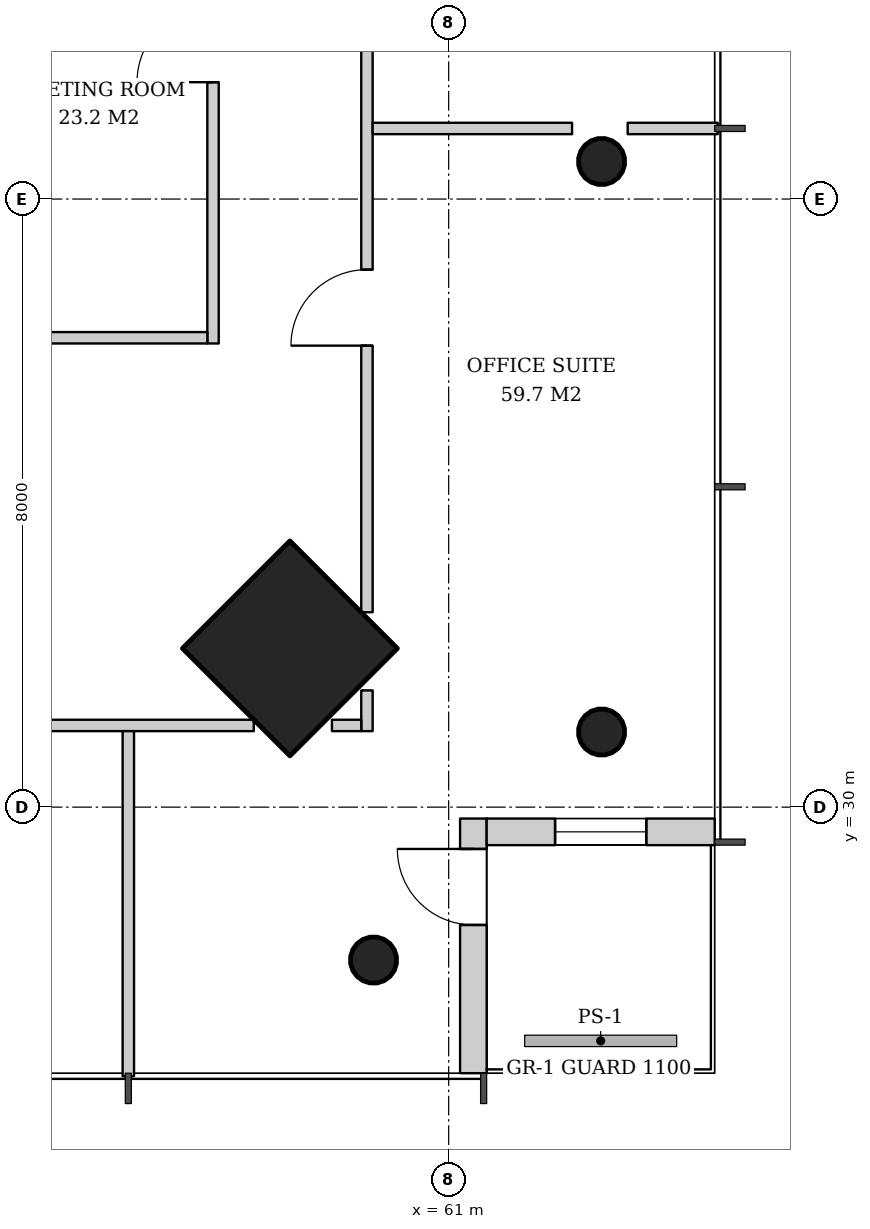
"""IFC4 building model, lengths in metres.
Left out: names, types, materials, properties, quantities, classifications, styles, units other than length and angle.
Written with IfcOpenShell. Run it as: python <this file> out.ifc"""

import sys

from ifc_helpers import new_model, si_unit, direction, frame, frame_2d, origin, origin_2d, place, context, subcontext, project, spatial, rectangle, hollow_circle, extrude, element, fill, save


model = new_model("IFC4")
c1 = context("Model", 3, precision=1e-05, world=origin(), true_north=direction((0.0, 1.0)))
c2 = subcontext(c1, "Body", "Model", "MODEL_VIEW")
j1 = project(units=[si_unit("LENGTHUNIT", "METRE"), si_unit("PLANEANGLEUNIT", "RADIAN")], contexts=[c1])
p1 = place(None, origin())
s1 = spatial("IfcSite", under=j1, at=p1, CompositionType="ELEMENT")
p2 = place(p1, origin())
s2 = spatial("IfcBuilding", under=s1, at=p2, CompositionType="ELEMENT")
p3 = place(p2, frame((0.0, 0.0, 207.2)))
s3 = spatial("IfcBuildingStorey", under=s2, at=p3, CompositionType="ELEMENT", Elevation=207.2)
p4 = place(p3, frame((63.05, 30.95, 0.0), z_axis=(-0.031962158256, 0.031962158256, 0.998977898093), x_axis=(-0.707106781187, -0.707106781187, 0.0)))
e1 = element("IfcColumn", 1, at=p4, inside=s3, PredefinedType="COLUMN", context=c2, shape_type="SweptSolid", body=[
    extrude(hollow_circle(Radius=0.305, WallThickness=0.025, at=origin_2d()), origin(), (0.0, 0.0, 1.0), 3.804),
])
p5 = place(p3, frame((63.05, 38.475, 0.0), z_axis=(-0.031974442509, 0.015923015547, 0.999361842679), x_axis=(-0.445775033553, -0.895145027055, 0.0)))
e2 = element("IfcColumn", 2, at=p5, inside=s3, PredefinedType="COLUMN", context=c2, shape_type="SweptSolid", body=[
    extrude(hollow_circle(Radius=0.305, WallThickness=0.025, at=origin_2d()), origin(), (0.0, 0.0, 1.0), 3.802),
])
p6 = place(p3, frame((58.95, 32.05, 0.0), z_axis=(-0.031898107953, 0.031898107953, 0.998981992539), x_axis=(-0.707106781187, -0.707106781187, 0.0)))
e3 = element("IfcColumn", 3, at=p6, inside=s3, PredefinedType="COLUMN", context=c2, shape_type="SweptSolid", body=[
    extrude(rectangle(XDim=2.0, YDim=2.0, at=origin_2d()), origin(), (0.0, 0.0, 1.0), 3.804),
])
p7 = place(p3, frame((60.05, 27.95, 0.0), z_axis=(-0.031962158256, 0.031962158256, 0.998977898093), x_axis=(-0.707106781187, -0.707106781187, 0.0)))
e4 = element("IfcColumn", 4, at=p7, inside=s3, PredefinedType="COLUMN", context=c2, shape_type="SweptSolid", body=[
    extrude(hollow_circle(Radius=0.305, WallThickness=0.025, at=origin_2d()), origin(), (0.0, 0.0, 1.0), 3.804),
])
p8 = place(p3, frame((61.325, 26.5, 0.0), z_axis=(0.0, 0.0, 1.0), x_axis=(0.0, 1.0, 0.0)))
e5 = element("IfcWall", 5, at=p8, inside=s3, PredefinedType="SOLIDWALL", context=c2, shape_type="SweptSolid", body=[
    extrude(rectangle(XDim=3.35, YDim=0.35, at=frame_2d((1.675, 0.0))), origin(), (0.0, 0.0, 1.0), 3.62),
])
p9 = place(p8, frame((1.95, 0.0, 0.0)))
e6 = element("IfcOpeningElement", 6, at=p9, cuts=e5, PredefinedType="OPENING", context=c2, shape_type="SweptSolid", body=[
    extrude(rectangle(XDim=1.0, YDim=2.4, at=frame_2d((0.5, 1.2))), frame((0.0, 0.185, 0.0), z_axis=(0.0, -1.0, 0.0), x_axis=(1.0, 0.0, 0.0)), (0.0, 0.0, 1.0), 0.37),
])
p10 = place(p3, frame((61.5, 29.675, 0.0), z_axis=(0.0, 0.0, 1.0), x_axis=(1.0, 0.0, 0.0)))
e7 = element("IfcWall", 7, at=p10, inside=s3, PredefinedType="SOLIDWALL", context=c2, shape_type="SweptSolid", body=[
    extrude(rectangle(XDim=3.0, YDim=0.35, at=frame_2d((1.5, 0.0))), origin(), (0.0, 0.0, 1.0), 3.62),
])
p11 = place(p10, frame((0.9, 0.0, 0.6)))
e8 = element("IfcOpeningElement", 8, at=p11, cuts=e7, PredefinedType="OPENING", context=c2, shape_type="SweptSolid", body=[
    extrude(rectangle(XDim=1.2, YDim=2.55, at=frame_2d((0.6, 1.275))), frame((0.0, 0.185, 0.0), z_axis=(0.0, -1.0, 0.0), x_axis=(1.0, 0.0, 0.0)), (0.0, 0.0, 1.0), 0.37),
])
p12 = place(p3, frame((57.9, 36.1, 0.0), z_axis=(0.0, 0.0, 1.0), x_axis=(0.0, 1.0, 0.0)))
e9 = element("IfcWall", 9, at=p12, inside=s3, PredefinedType="PARTITIONING", context=c2, shape_type="SweptSolid", body=[
    extrude(rectangle(XDim=7.875, YDim=0.15, at=frame_2d((3.938, 0.0))), origin(), (0.0, 0.0, 1.0), 2.867),
])
p13 = place(p12, frame((3.438, 0.0, 0.0)))
e10 = element("IfcOpeningElement", 10, at=p13, cuts=e9, PredefinedType="OPENING", context=c2, shape_type="SweptSolid", body=[
    extrude(rectangle(XDim=1.0, YDim=2.1, at=frame_2d((0.5, 1.05))), frame((0.0, 0.085, 0.0), z_axis=(0.0, -1.0, 0.0), x_axis=(1.0, 0.0, 0.0)), (0.0, 0.0, 1.0), 0.17),
])
p14 = place(p3, frame((54.9, 36.175, 0.0), z_axis=(0.0, 0.0, 1.0), x_axis=(1.0, 0.0, 0.0)))
e11 = element("IfcWall", 11, at=p14, inside=s3, PredefinedType="PARTITIONING", context=c2, shape_type="SweptSolid", body=[
    extrude(rectangle(XDim=2.925, YDim=0.15, at=frame_2d((1.462, 0.0))), origin(), (0.0, 0.0, 1.0), 2.867),
])
p15 = place(p3, frame((59.925, 31.0, 0.0), z_axis=(0.0, 0.0, 1.0), x_axis=(0.0, 1.0, 0.0)))
e12 = element("IfcWall", 12, at=p15, inside=s3, PredefinedType="PARTITIONING", context=c2, shape_type="SweptSolid", body=[
    extrude(rectangle(XDim=0.536, YDim=0.15, at=frame_2d((0.268, 0.0))), origin(), (0.0, 0.0, 1.0), 3.32),
])
p16 = place(p3, frame((59.925, 32.564, 0.0), z_axis=(0.0, 0.0, 1.0), x_axis=(0.0, 1.0, 0.0)))
e13 = element("IfcWall", 13, at=p16, inside=s3, PredefinedType="PARTITIONING", context=c2, shape_type="SweptSolid", body=[
    extrude(rectangle(XDim=26.872, YDim=0.15, at=frame_2d((13.436, 0.0))), origin(), (0.0, 0.0, 1.0), 2.867),
])
p17 = place(p16, frame((3.507, 0.0, 0.0)))
e14 = element("IfcOpeningElement", 14, at=p17, cuts=e13, PredefinedType="OPENING", context=c2, shape_type="SweptSolid", body=[
    extrude(rectangle(XDim=1.0, YDim=2.1, at=frame_2d((0.5, 1.05))), frame((0.0, 0.085, 0.0), z_axis=(0.0, -1.0, 0.0), x_axis=(1.0, 0.0, 0.0)), (0.0, 0.0, 1.0), 0.17),
])
p18 = place(p16, frame((8.221, 0.0, 0.0)))
e15 = element("IfcOpeningElement", 15, at=p18, cuts=e13, PredefinedType="OPENING", context=c2, shape_type="SweptSolid", body=[
    extrude(rectangle(XDim=1.0, YDim=2.1, at=frame_2d((0.5, 1.05))), frame((0.0, 0.085, 0.0), z_axis=(0.0, -1.0, 0.0), x_axis=(1.0, 0.0, 0.0)), (0.0, 0.0, 1.0), 0.17),
])
p19 = place(p16, frame((12.936, 0.0, 0.0)))
e16 = element("IfcOpeningElement", 16, at=p19, cuts=e13, PredefinedType="OPENING", context=c2, shape_type="SweptSolid", body=[
    extrude(rectangle(XDim=1.0, YDim=2.1, at=frame_2d((0.5, 1.05))), frame((0.0, 0.085, 0.0), z_axis=(0.0, -1.0, 0.0), x_axis=(1.0, 0.0, 0.0)), (0.0, 0.0, 1.0), 0.17),
])
p20 = place(p16, frame((17.65, 0.0, 0.0)))
e17 = element("IfcOpeningElement", 17, at=p20, cuts=e13, PredefinedType="OPENING", context=c2, shape_type="SweptSolid", body=[
    extrude(rectangle(XDim=1.0, YDim=2.1, at=frame_2d((0.5, 1.05))), frame((0.0, 0.085, 0.0), z_axis=(0.0, -1.0, 0.0), x_axis=(1.0, 0.0, 0.0)), (0.0, 0.0, 1.0), 0.17),
])
p21 = place(p16, frame((22.364, 0.0, 0.0)))
e18 = element("IfcOpeningElement", 18, at=p21, cuts=e13, PredefinedType="OPENING", context=c2, shape_type="SweptSolid", body=[
    extrude(rectangle(XDim=1.0, YDim=2.1, at=frame_2d((0.5, 1.05))), frame((0.0, 0.085, 0.0), z_axis=(0.0, -1.0, 0.0), x_axis=(1.0, 0.0, 0.0)), (0.0, 0.0, 1.0), 0.17),
])
p22 = place(p3, frame((60.0, 38.928, 0.0), z_axis=(0.0, 0.0, 1.0), x_axis=(1.0, 0.0, 0.0)))
e19 = element("IfcWall", 19, at=p22, inside=s3, PredefinedType="PARTITIONING", context=c2, shape_type="SweptSolid", body=[
    extrude(rectangle(XDim=2.624, YDim=0.15, at=frame_2d((1.312, 0.0))), origin(), (0.0, 0.0, 1.0), 3.62),
])
p23 = place(p3, frame((63.355, 38.928, 0.0), z_axis=(0.0, 0.0, 1.0), x_axis=(1.0, 0.0, 0.0)))
e20 = element("IfcWall", 20, at=p23, inside=s3, PredefinedType="PARTITIONING", context=c2, shape_type="SweptSolid", body=[
    extrude(rectangle(XDim=1.185, YDim=0.15, at=frame_2d((0.593, 0.0))), origin(), (0.0, 0.0, 1.0), 3.62),
])
p24 = place(p3, frame((31.564, 31.075, 0.0), z_axis=(0.0, 0.0, 1.0), x_axis=(1.0, 0.0, 0.0)))
e21 = element("IfcWall", 21, at=p24, inside=s3, PredefinedType="PARTITIONING", context=c2, shape_type="SweptSolid", body=[
    extrude(rectangle(XDim=26.872, YDim=0.15, at=frame_2d((13.436, 0.0))), origin(), (0.0, 0.0, 1.0), 2.867),
])
p25 = place(p24, frame((3.507, 0.0, 0.0)))
e22 = element("IfcOpeningElement", 22, at=p25, cuts=e21, PredefinedType="OPENING", context=c2, shape_type="SweptSolid", body=[
    extrude(rectangle(XDim=1.0, YDim=2.1, at=frame_2d((0.5, 1.05))), frame((0.0, 0.085, 0.0), z_axis=(0.0, -1.0, 0.0), x_axis=(1.0, 0.0, 0.0)), (0.0, 0.0, 1.0), 0.17),
])
p26 = place(p24, frame((8.221, 0.0, 0.0)))
e23 = element("IfcOpeningElement", 23, at=p26, cuts=e21, PredefinedType="OPENING", context=c2, shape_type="SweptSolid", body=[
    extrude(rectangle(XDim=1.0, YDim=2.1, at=frame_2d((0.5, 1.05))), frame((0.0, 0.085, 0.0), z_axis=(0.0, -1.0, 0.0), x_axis=(1.0, 0.0, 0.0)), (0.0, 0.0, 1.0), 0.17),
])
p27 = place(p24, frame((12.936, 0.0, 0.0)))
e24 = element("IfcOpeningElement", 24, at=p27, cuts=e21, PredefinedType="OPENING", context=c2, shape_type="SweptSolid", body=[
    extrude(rectangle(XDim=1.0, YDim=2.1, at=frame_2d((0.5, 1.05))), frame((0.0, 0.085, 0.0), z_axis=(0.0, -1.0, 0.0), x_axis=(1.0, 0.0, 0.0)), (0.0, 0.0, 1.0), 0.17),
])
p28 = place(p24, frame((17.65, 0.0, 0.0)))
e25 = element("IfcOpeningElement", 25, at=p28, cuts=e21, PredefinedType="OPENING", context=c2, shape_type="SweptSolid", body=[
    extrude(rectangle(XDim=1.0, YDim=2.1, at=frame_2d((0.5, 1.05))), frame((0.0, 0.085, 0.0), z_axis=(0.0, -1.0, 0.0), x_axis=(1.0, 0.0, 0.0)), (0.0, 0.0, 1.0), 0.17),
])
p29 = place(p24, frame((22.364, 0.0, 0.0)))
e26 = element("IfcOpeningElement", 26, at=p29, cuts=e21, PredefinedType="OPENING", context=c2, shape_type="SweptSolid", body=[
    extrude(rectangle(XDim=1.0, YDim=2.1, at=frame_2d((0.5, 1.05))), frame((0.0, 0.085, 0.0), z_axis=(0.0, -1.0, 0.0), x_axis=(1.0, 0.0, 0.0)), (0.0, 0.0, 1.0), 0.17),
])
p30 = place(p3, frame((59.464, 31.075, 0.0), z_axis=(0.0, 0.0, 1.0), x_axis=(1.0, 0.0, 0.0)))
e27 = element("IfcWall", 27, at=p30, inside=s3, PredefinedType="PARTITIONING", context=c2, shape_type="SweptSolid", body=[
    extrude(rectangle(XDim=0.386, YDim=0.15, at=frame_2d((0.193, 0.0))), origin(), (0.0, 0.0, 1.0), 3.32),
])
p31 = place(p3, frame((56.786, 31.0, 0.0), z_axis=(0.0, 0.0, 1.0), x_axis=(0.0, -1.0, 0.0)))
e28 = element("IfcWall", 28, at=p31, inside=s3, PredefinedType="PARTITIONING", context=c2, shape_type="SweptSolid", body=[
    extrude(rectangle(XDim=4.54, YDim=0.15, at=frame_2d((2.27, 0.0))), origin(), (0.0, 0.0, 1.0), 3.12),
])
p32 = place(p9, origin())
e29 = element("IfcDoor", 29, at=p32, inside=s3, OperationType="SINGLE_SWING_RIGHT", PredefinedType="DOOR", context=c2, shape_type="SweptSolid", body=[
    extrude(rectangle(XDim=1.0, YDim=2.4, at=frame_2d((0.5, 1.2))), frame((0.0, 0.025, 0.0), z_axis=(0.0, -1.0, 0.0), x_axis=(1.0, 0.0, 0.0)), (0.0, 0.0, 1.0), 0.05),
])
fill(e6, e29)
p33 = place(p11, origin())
e30 = element("IfcWindow", 30, at=p33, inside=s3, PartitioningType="SINGLE_PANEL", PredefinedType="WINDOW", context=c2, shape_type="SweptSolid", body=[
    extrude(rectangle(XDim=1.2, YDim=2.55, at=frame_2d((0.6, 1.275))), frame((0.0, 0.03, 0.0), z_axis=(0.0, -1.0, 0.0), x_axis=(1.0, 0.0, 0.0)), (0.0, 0.0, 1.0), 0.06),
])
fill(e8, e30)
p34 = place(p13, origin())
e31 = element("IfcDoor", 31, at=p34, inside=s3, OperationType="SINGLE_SWING_LEFT", PredefinedType="DOOR", context=c2, shape_type="SweptSolid", body=[
    extrude(rectangle(XDim=1.0, YDim=2.1, at=frame_2d((0.5, 1.05))), frame((0.0, 0.025, 0.0), z_axis=(0.0, -1.0, 0.0), x_axis=(1.0, 0.0, 0.0)), (0.0, 0.0, 1.0), 0.05),
])
fill(e10, e31)
p35 = place(p17, origin())
e32 = element("IfcDoor", 32, at=p35, inside=s3, OperationType="SINGLE_SWING_LEFT", PredefinedType="DOOR", context=c2, shape_type="SweptSolid", body=[
    extrude(rectangle(XDim=1.0, YDim=2.1, at=frame_2d((0.5, 1.05))), frame((0.0, 0.025, 0.0), z_axis=(0.0, -1.0, 0.0), x_axis=(1.0, 0.0, 0.0)), (0.0, 0.0, 1.0), 0.05),
])
fill(e14, e32)
save(model, sys.argv[1])
